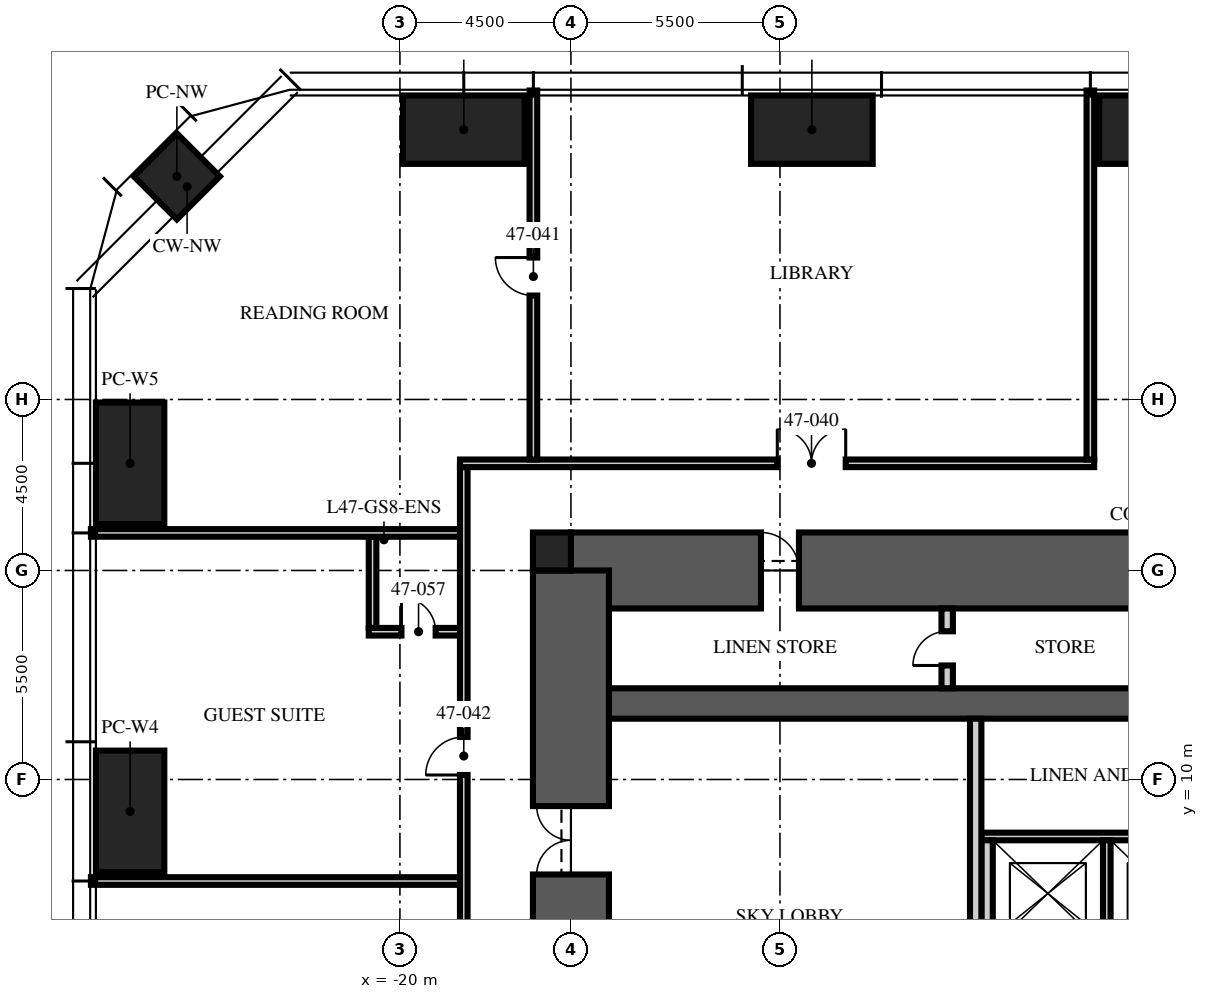
"""IFC4 building model, lengths in metres.
Left out: names, types, materials, properties, quantities, classifications, styles, units other than length and angle.
Written with IfcOpenShell. Run it as: python <this file> out.ifc"""

import sys

from ifc_helpers import new_model, si_unit, direction, frame, frame_2d, origin, origin_2d, place, context, subcontext, project, spatial, rectangle, hollow_rectangle, extrude, element, fill, save


model = new_model("IFC4")
c1 = context("Model", 3, precision=1e-05, world=origin(), true_north=direction((0.0, 1.0)))
c2 = subcontext(c1, "Body", "Model", "MODEL_VIEW")
j1 = project(units=[si_unit("LENGTHUNIT", "METRE"), si_unit("PLANEANGLEUNIT", "RADIAN")], contexts=[c1])
p1 = place(None, origin())
s1 = spatial("IfcSite", under=j1, at=p1, CompositionType="ELEMENT")
p2 = place(p1, origin())
s2 = spatial("IfcBuilding", under=s1, at=p2, CompositionType="ELEMENT")
p3 = place(p2, frame((0.0, 0.0, 186.0)))
s3 = spatial("IfcBuildingStorey", under=s2, at=p3, CompositionType="ELEMENT", Elevation=186.0)
p4 = place(p3, frame((-15.5, 15.5, -0.3), z_axis=(0.0, 0.0, 1.0), x_axis=(1.0, 0.0, 0.0)))
e1 = element("IfcWall", 1, at=p4, inside=s3, PredefinedType="SHEAR", context=c2, shape_type="SweptSolid", body=[
    extrude(rectangle(XDim=31.0, YDim=2.0, at=frame_2d((15.5, 0.0))), origin(), (0.0, 0.0, 1.0), 5.95),
])
p5 = place(p4, frame((5.0, 0.0, 0.3)))
e2 = element("IfcOpeningElement", 2, at=p5, cuts=e1, PredefinedType="OPENING", context=c2, shape_type="SweptSolid", body=[
    extrude(rectangle(XDim=1.0, YDim=2.1, at=frame_2d((0.5, 1.05))), frame((0.0, 1.01, 0.0), z_axis=(0.0, -1.0, 0.0), x_axis=(1.0, 0.0, 0.0)), (0.0, 0.0, 1.0), 2.02),
])
p6 = place(p3, frame((-15.5, 12.0, -0.3), z_axis=(0.0, 0.0, 1.0), x_axis=(1.0, 0.0, 0.0)))
e3 = element("IfcWall", 3, at=p6, inside=s3, PredefinedType="SHEAR", context=c2, shape_type="SweptSolid", body=[
    extrude(rectangle(XDim=31.0, YDim=0.8, at=frame_2d((15.5, 0.0))), origin(), (0.0, 0.0, 1.0), 5.95),
])
p7 = place(p3, frame((-15.5, -15.5, -0.3), z_axis=(0.0, 0.0, 1.0), x_axis=(0.0, 1.0, 0.0)))
e4 = element("IfcWall", 4, at=p7, inside=s3, PredefinedType="SHEAR", context=c2, shape_type="SweptSolid", body=[
    extrude(rectangle(XDim=31.0, YDim=2.0, at=frame_2d((15.5, 0.0))), origin(), (0.0, 0.0, 1.0), 5.95),
])
p8 = place(p7, frame((6.5, 0.0, 0.3)))
e5 = element("IfcOpeningElement", 5, at=p8, cuts=e4, PredefinedType="OPENING", context=c2, shape_type="SweptSolid", body=[
    extrude(rectangle(XDim=1.2, YDim=2.1, at=frame_2d((0.6, 1.05))), frame((0.0, 1.01, 0.0), z_axis=(0.0, -1.0, 0.0), x_axis=(1.0, 0.0, 0.0)), (0.0, 0.0, 1.0), 2.02),
])
p9 = place(p7, frame((23.0, 0.0, 0.3)))
e6 = element("IfcOpeningElement", 6, at=p9, cuts=e4, PredefinedType="OPENING", context=c2, shape_type="SweptSolid", body=[
    extrude(rectangle(XDim=1.8, YDim=2.1, at=frame_2d((0.9, 1.05))), frame((0.0, 1.01, 0.0), z_axis=(0.0, -1.0, 0.0), x_axis=(1.0, 0.0, 0.0)), (0.0, 0.0, 1.0), 2.02),
])
p10 = place(p3, frame((-16.0, 16.0, -0.3), z_axis=(0.0, 0.0, 1.0), x_axis=(1.0, 0.0, 0.0)))
e7 = element("IfcColumn", 7, at=p10, inside=s3, PredefinedType="COLUMN", context=c2, shape_type="SweptSolid", body=[
    extrude(rectangle(XDim=1.0, YDim=1.0, at=origin_2d()), origin(), (0.0, 0.0, 1.0), 5.95),
])
p11 = place(p3, frame((-18.32, 27.1, 0.0), z_axis=(0.0, 0.0, 1.0), x_axis=(1.0, 0.0, 0.0)))
e8 = element("IfcColumn", 8, at=p11, inside=s3, PredefinedType="COLUMN", context=c2, shape_type="SweptSolid", body=[
    extrude(hollow_rectangle(XDim=3.2, YDim=1.8, WallThickness=0.2, at=origin_2d()), origin(), (0.0, 0.0, 1.0), 4.72),
])
p12 = place(p3, frame((-9.16, 27.1, 0.0), z_axis=(0.0, 0.0, 1.0), x_axis=(1.0, 0.0, 0.0)))
e9 = element("IfcColumn", 9, at=p12, inside=s3, PredefinedType="COLUMN", context=c2, shape_type="SweptSolid", body=[
    extrude(hollow_rectangle(XDim=3.2, YDim=1.8, WallThickness=0.2, at=origin_2d()), origin(), (0.0, 0.0, 1.0), 4.87),
])
p13 = place(p3, frame((0.0, 27.1, 0.0), z_axis=(0.0, 0.0, 1.0), x_axis=(1.0, 0.0, 0.0)))
e10 = element("IfcColumn", 10, at=p13, inside=s3, PredefinedType="COLUMN", context=c2, shape_type="SweptSolid", body=[
    extrude(hollow_rectangle(XDim=3.2, YDim=1.8, WallThickness=0.2, at=origin_2d()), origin(), (0.0, 0.0, 1.0), 5.03),
])
p14 = place(p3, frame((-27.1, 9.16, 0.0), z_axis=(0.0, 0.0, 1.0), x_axis=(0.0, 1.0, 0.0)))
e11 = element("IfcColumn", 11, at=p14, inside=s3, PredefinedType="COLUMN", context=c2, shape_type="SweptSolid", body=[
    extrude(hollow_rectangle(XDim=3.2, YDim=1.8, WallThickness=0.2, at=origin_2d()), origin(), (0.0, 0.0, 1.0), 4.87),
])
p15 = place(p3, frame((-27.1, 18.32, 0.0), z_axis=(0.0, 0.0, 1.0), x_axis=(0.0, 1.0, 0.0)))
e12 = element("IfcColumn", 12, at=p15, inside=s3, PredefinedType="COLUMN", context=c2, shape_type="SweptSolid", body=[
    extrude(hollow_rectangle(XDim=3.2, YDim=1.8, WallThickness=0.2, at=origin_2d()), origin(), (0.0, 0.0, 1.0), 4.72),
])
p16 = place(p3, frame((-25.87, 25.87, 0.0), z_axis=(0.0, 0.0, 1.0), x_axis=(0.707106781187, 0.707106781187, 0.0)))
e13 = element("IfcColumn", 13, at=p16, inside=s3, PredefinedType="COLUMN", context=c2, shape_type="SweptSolid", body=[
    extrude(hollow_rectangle(XDim=1.6, YDim=1.6, WallThickness=0.1, at=origin_2d()), origin(), (0.0, 0.0, 1.0), 4.99),
])
p17 = place(p3, frame((-4.7, 8.5, 0.0), z_axis=(0.0, 0.0, 1.0), x_axis=(1.0, 0.0, 0.0)))
e14 = element("IfcWall", 14, at=p17, inside=s3, PredefinedType="PARTITIONING", context=c2, shape_type="SweptSolid", body=[
    extrude(rectangle(XDim=9.7, YDim=0.2, at=frame_2d((4.85, 0.0))), origin(), (0.0, 0.0, 1.0), 5.65),
])
p18 = place(p3, frame((-4.55, 5.6, 0.0), z_axis=(0.0, 0.0, 1.0), x_axis=(0.0, 1.0, 0.0)))
e15 = element("IfcWall", 15, at=p18, inside=s3, PredefinedType="PARTITIONING", context=c2, shape_type="SweptSolid", body=[
    extrude(rectangle(XDim=2.8, YDim=0.3, at=frame_2d((1.4, 0.0))), origin(), (0.0, 0.0, 1.0), 5.65),
])
p19 = place(p3, frame((-1.4, 5.6, 0.0), z_axis=(0.0, 0.0, 1.0), x_axis=(0.0, 1.0, 0.0)))
e16 = element("IfcWall", 16, at=p19, inside=s3, PredefinedType="PARTITIONING", context=c2, shape_type="SweptSolid", body=[
    extrude(rectangle(XDim=2.8, YDim=0.2, at=frame_2d((1.4, 0.0))), origin(), (0.0, 0.0, 1.0), 5.65),
])
p20 = place(p3, frame((-4.85, 5.3, 0.0), z_axis=(0.0, 0.0, 1.0), x_axis=(0.0, 1.0, 0.0)))
e17 = element("IfcWall", 17, at=p20, inside=s3, PredefinedType="PARTITIONING", context=c2, shape_type="SweptSolid", body=[
    extrude(rectangle(XDim=6.3, YDim=0.3, at=frame_2d((3.15, 0.0))), origin(), (0.0, 0.0, 1.0), 5.65),
])
p21 = place(p3, frame((-5.6, 12.4, 0.0), z_axis=(0.0, 0.0, 1.0), x_axis=(0.0, 1.0, 0.0)))
e18 = element("IfcWall", 18, at=p21, inside=s3, PredefinedType="PARTITIONING", context=c2, shape_type="SweptSolid", body=[
    extrude(rectangle(XDim=2.1, YDim=0.3, at=frame_2d((1.05, 0.0))), origin(), (0.0, 0.0, 1.0), 5.65),
])
p22 = place(p21, frame((0.6, 0.0, 0.0)))
e19 = element("IfcOpeningElement", 19, at=p22, cuts=e18, PredefinedType="OPENING", context=c2, shape_type="SweptSolid", body=[
    extrude(rectangle(XDim=0.9, YDim=2.1, at=frame_2d((0.45, 1.05))), frame((0.0, 0.16, 0.0), z_axis=(0.0, -1.0, 0.0), x_axis=(1.0, 0.0, 0.0)), (0.0, 0.0, 1.0), 0.32),
])
p23 = place(p3, frame((-18.32, -18.22, 0.0), z_axis=(0.0, 0.0, 1.0), x_axis=(0.0, 1.0, 0.0)))
e20 = element("IfcWall", 20, at=p23, inside=s3, PredefinedType="SOLIDWALL", context=c2, shape_type="SweptSolid", body=[
    extrude(rectangle(XDim=36.44, YDim=0.2, at=frame_2d((18.22, 0.0))), origin(), (0.0, 0.0, 1.0), 4.45),
])
p24 = place(p23, frame((0.326, 0.0, 0.0)))
e21 = element("IfcOpeningElement", 21, at=p24, cuts=e20, PredefinedType="OPENING", context=c2, shape_type="SweptSolid", body=[
    extrude(rectangle(XDim=1.0, YDim=2.1, at=frame_2d((0.5, 1.05))), frame((0.0, 0.11, 0.0), z_axis=(0.0, -1.0, 0.0), x_axis=(1.0, 0.0, 0.0)), (0.0, 0.0, 1.0), 0.22),
])
p25 = place(p23, frame((7.122, 0.0, 0.0)))
e22 = element("IfcOpeningElement", 22, at=p25, cuts=e20, PredefinedType="OPENING", context=c2, shape_type="SweptSolid", body=[
    extrude(rectangle(XDim=1.0, YDim=2.1, at=frame_2d((0.5, 1.05))), frame((0.0, 0.11, 0.0), z_axis=(0.0, -1.0, 0.0), x_axis=(1.0, 0.0, 0.0)), (0.0, 0.0, 1.0), 0.22),
])
p26 = place(p23, frame((28.338, 0.0, 0.0)))
e23 = element("IfcOpeningElement", 23, at=p26, cuts=e20, PredefinedType="OPENING", context=c2, shape_type="SweptSolid", body=[
    extrude(rectangle(XDim=1.0, YDim=2.1, at=frame_2d((0.5, 1.05))), frame((0.0, 0.11, 0.0), z_axis=(0.0, -1.0, 0.0), x_axis=(1.0, 0.0, 0.0)), (0.0, 0.0, 1.0), 0.22),
])
p27 = place(p23, frame((22.34, 0.0, 0.0)))
e24 = element("IfcOpeningElement", 24, at=p27, cuts=e20, PredefinedType="OPENING", context=c2, shape_type="SweptSolid", body=[
    extrude(rectangle(XDim=0.9, YDim=2.1, at=frame_2d((0.45, 1.05))), frame((0.0, 0.11, 0.0), z_axis=(0.0, -1.0, 0.0), x_axis=(1.0, 0.0, 0.0)), (0.0, 0.0, 1.0), 0.22),
])
p28 = place(p23, frame((13.2, 0.0, 0.0)))
e25 = element("IfcOpeningElement", 25, at=p28, cuts=e20, PredefinedType="OPENING", context=c2, shape_type="SweptSolid", body=[
    extrude(rectangle(XDim=0.9, YDim=2.1, at=frame_2d((0.45, 1.05))), frame((0.0, 0.11, 0.0), z_axis=(0.0, -1.0, 0.0), x_axis=(1.0, 0.0, 0.0)), (0.0, 0.0, 1.0), 0.22),
])
p29 = place(p23, frame((17.72, 0.0, 0.0)))
e26 = element("IfcOpeningElement", 26, at=p29, cuts=e20, PredefinedType="OPENING", context=c2, shape_type="SweptSolid", body=[
    extrude(rectangle(XDim=1.0, YDim=2.1, at=frame_2d((0.5, 1.05))), frame((0.0, 0.11, 0.0), z_axis=(0.0, -1.0, 0.0), x_axis=(1.0, 0.0, 0.0)), (0.0, 0.0, 1.0), 0.22),
])
p30 = place(p3, frame((-28.13, 7.328, 0.0), z_axis=(0.0, 0.0, 1.0), x_axis=(1.0, 0.0, 0.0)))
e27 = element("IfcWall", 27, at=p30, inside=s3, PredefinedType="SOLIDWALL", context=c2, shape_type="SweptSolid", body=[
    extrude(rectangle(XDim=9.71, YDim=0.2, at=frame_2d((4.855, 0.0))), origin(), (0.0, 0.0, 1.0), 4.95),
])
p31 = place(p3, frame((-20.82, 13.888, 0.0), z_axis=(0.0, 0.0, 1.0), x_axis=(1.0, 0.0, 0.0)))
e28 = element("IfcWall", 28, at=p31, inside=s3, PredefinedType="SOLIDWALL", context=c2, shape_type="SweptSolid", body=[
    extrude(rectangle(XDim=2.4, YDim=0.2, at=frame_2d((1.2, 0.0))), origin(), (0.0, 0.0, 1.0), 4.45),
])
p32 = place(p31, frame((0.86, 0.0, 0.0)))
e29 = element("IfcOpeningElement", 29, at=p32, cuts=e28, PredefinedType="OPENING", context=c2, shape_type="SweptSolid", body=[
    extrude(rectangle(XDim=0.9, YDim=2.1, at=frame_2d((0.45, 1.05))), frame((0.0, 0.11, 0.0), z_axis=(0.0, -1.0, 0.0), x_axis=(1.0, 0.0, 0.0)), (0.0, 0.0, 1.0), 0.22),
])
p33 = place(p3, frame((-20.72, 13.988, 0.0), z_axis=(0.0, 0.0, 1.0), x_axis=(0.0, 1.0, 0.0)))
e30 = element("IfcWall", 30, at=p33, inside=s3, PredefinedType="SOLIDWALL", context=c2, shape_type="SweptSolid", body=[
    extrude(rectangle(XDim=2.4, YDim=0.2, at=frame_2d((1.2, 0.0))), origin(), (0.0, 0.0, 1.0), 5.65),
])
p34 = place(p3, frame((-28.13, 16.488, 0.0), z_axis=(0.0, 0.0, 1.0), x_axis=(1.0, 0.0, 0.0)))
e31 = element("IfcWall", 31, at=p34, inside=s3, PredefinedType="SOLIDWALL", context=c2, shape_type="SweptSolid", body=[
    extrude(rectangle(XDim=9.71, YDim=0.2, at=frame_2d((4.855, 0.0))), origin(), (0.0, 0.0, 1.0), 4.95),
])
p35 = place(p3, frame((-18.42, 18.32, 0.0), z_axis=(0.0, 0.0, 1.0), x_axis=(1.0, 0.0, 0.0)))
e32 = element("IfcWall", 32, at=p35, inside=s3, PredefinedType="SOLIDWALL", context=c2, shape_type="SweptSolid", body=[
    extrude(rectangle(XDim=16.688, YDim=0.2, at=frame_2d((8.344, 0.0))), origin(), (0.0, 0.0, 1.0), 4.45),
])
p36 = place(p35, frame((8.35, 0.0, 0.0)))
e33 = element("IfcOpeningElement", 33, at=p36, cuts=e32, PredefinedType="OPENING", context=c2, shape_type="SweptSolid", body=[
    extrude(rectangle(XDim=1.8, YDim=2.4, at=frame_2d((0.9, 1.2))), frame((0.0, 0.11, 0.0), z_axis=(0.0, -1.0, 0.0), x_axis=(1.0, 0.0, 0.0)), (0.0, 0.0, 1.0), 0.22),
])
p37 = place(p3, frame((-16.488, 18.42, 0.0), z_axis=(0.0, 0.0, 1.0), x_axis=(0.0, 1.0, 0.0)))
e34 = element("IfcWall", 34, at=p37, inside=s3, PredefinedType="SOLIDWALL", context=c2, shape_type="SweptSolid", body=[
    extrude(rectangle(XDim=9.71, YDim=0.2, at=frame_2d((4.855, 0.0))), origin(), (0.0, 0.0, 1.0), 4.95),
])
p38 = place(p37, frame((4.315, 0.0, 0.0)))
e35 = element("IfcOpeningElement", 35, at=p38, cuts=e34, PredefinedType="OPENING", context=c2, shape_type="SweptSolid", body=[
    extrude(rectangle(XDim=1.0, YDim=2.1, at=frame_2d((0.5, 1.05))), frame((0.0, 0.11, 0.0), z_axis=(0.0, -1.0, 0.0), x_axis=(1.0, 0.0, 0.0)), (0.0, 0.0, 1.0), 0.22),
])
p39 = place(p3, frame((-1.832, 18.42, 0.0), z_axis=(0.0, 0.0, 1.0), x_axis=(0.0, 1.0, 0.0)))
e36 = element("IfcWall", 36, at=p39, inside=s3, PredefinedType="SOLIDWALL", context=c2, shape_type="SweptSolid", body=[
    extrude(rectangle(XDim=9.71, YDim=0.2, at=frame_2d((4.855, 0.0))), origin(), (0.0, 0.0, 1.0), 4.95),
])
p40 = place(p9, origin())
e37 = element("IfcDoor", 37, at=p40, inside=s3, OperationType="DOUBLE_DOOR_SINGLE_SWING", PredefinedType="DOOR", context=c2, shape_type="SweptSolid", body=[
    extrude(rectangle(XDim=1.8, YDim=2.1, at=frame_2d((0.9, 1.05))), frame((0.0, 0.025, 0.0), z_axis=(0.0, -1.0, 0.0), x_axis=(1.0, 0.0, 0.0)), (0.0, 0.0, 1.0), 0.05),
])
fill(e6, e37)
p41 = place(p22, origin())
e38 = element("IfcDoor", 38, at=p41, inside=s3, OperationType="SINGLE_SWING_LEFT", PredefinedType="DOOR", context=c2, shape_type="SweptSolid", body=[
    extrude(rectangle(XDim=0.9, YDim=2.1, at=frame_2d((0.45, 1.05))), frame((0.0, 0.025, 0.0), z_axis=(0.0, -1.0, 0.0), x_axis=(1.0, 0.0, 0.0)), (0.0, 0.0, 1.0), 0.05),
])
fill(e19, e38)
p42 = place(p5, origin())
e39 = element("IfcDoor", 39, at=p42, inside=s3, OperationType="SINGLE_SWING_LEFT", PredefinedType="DOOR", context=c2, shape_type="SweptSolid", body=[
    extrude(rectangle(XDim=1.0, YDim=2.1, at=frame_2d((0.5, 1.05))), frame((0.0, 0.025, 0.0), z_axis=(0.0, -1.0, 0.0), x_axis=(1.0, 0.0, 0.0)), (0.0, 0.0, 1.0), 0.05),
])
fill(e2, e39)
p43 = place(p36, origin())
e40 = element("IfcDoor", 40, at=p43, inside=s3, OperationType="DOUBLE_DOOR_SINGLE_SWING", PredefinedType="DOOR", context=c2, shape_type="SweptSolid", body=[
    extrude(rectangle(XDim=1.8, YDim=2.4, at=frame_2d((0.9, 1.2))), frame((0.0, 0.025, 0.0), z_axis=(0.0, -1.0, 0.0), x_axis=(1.0, 0.0, 0.0)), (0.0, 0.0, 1.0), 0.05),
])
fill(e33, e40)
p44 = place(p38, origin())
e41 = element("IfcDoor", 41, at=p44, inside=s3, OperationType="SINGLE_SWING_RIGHT", PredefinedType="DOOR", context=c2, shape_type="SweptSolid", body=[
    extrude(rectangle(XDim=1.0, YDim=2.1, at=frame_2d((0.5, 1.05))), frame((0.0, 0.025, 0.0), z_axis=(0.0, -1.0, 0.0), x_axis=(1.0, 0.0, 0.0)), (0.0, 0.0, 1.0), 0.05),
])
fill(e35, e41)
p45 = place(p26, origin())
e42 = element("IfcDoor", 42, at=p45, inside=s3, OperationType="SINGLE_SWING_LEFT", PredefinedType="DOOR", context=c2, shape_type="SweptSolid", body=[
    extrude(rectangle(XDim=1.0, YDim=2.1, at=frame_2d((0.5, 1.05))), frame((0.0, 0.025, 0.0), z_axis=(0.0, -1.0, 0.0), x_axis=(1.0, 0.0, 0.0)), (0.0, 0.0, 1.0), 0.05),
])
fill(e23, e42)
p46 = place(p32, origin())
e43 = element("IfcDoor", 43, at=p46, inside=s3, OperationType="SINGLE_SWING_LEFT", PredefinedType="DOOR", context=c2, shape_type="SweptSolid", body=[
    extrude(rectangle(XDim=0.9, YDim=2.1, at=frame_2d((0.45, 1.05))), frame((0.0, 0.025, 0.0), z_axis=(0.0, -1.0, 0.0), x_axis=(1.0, 0.0, 0.0)), (0.0, 0.0, 1.0), 0.05),
])
fill(e29, e43)
save(model, sys.argv[1])
